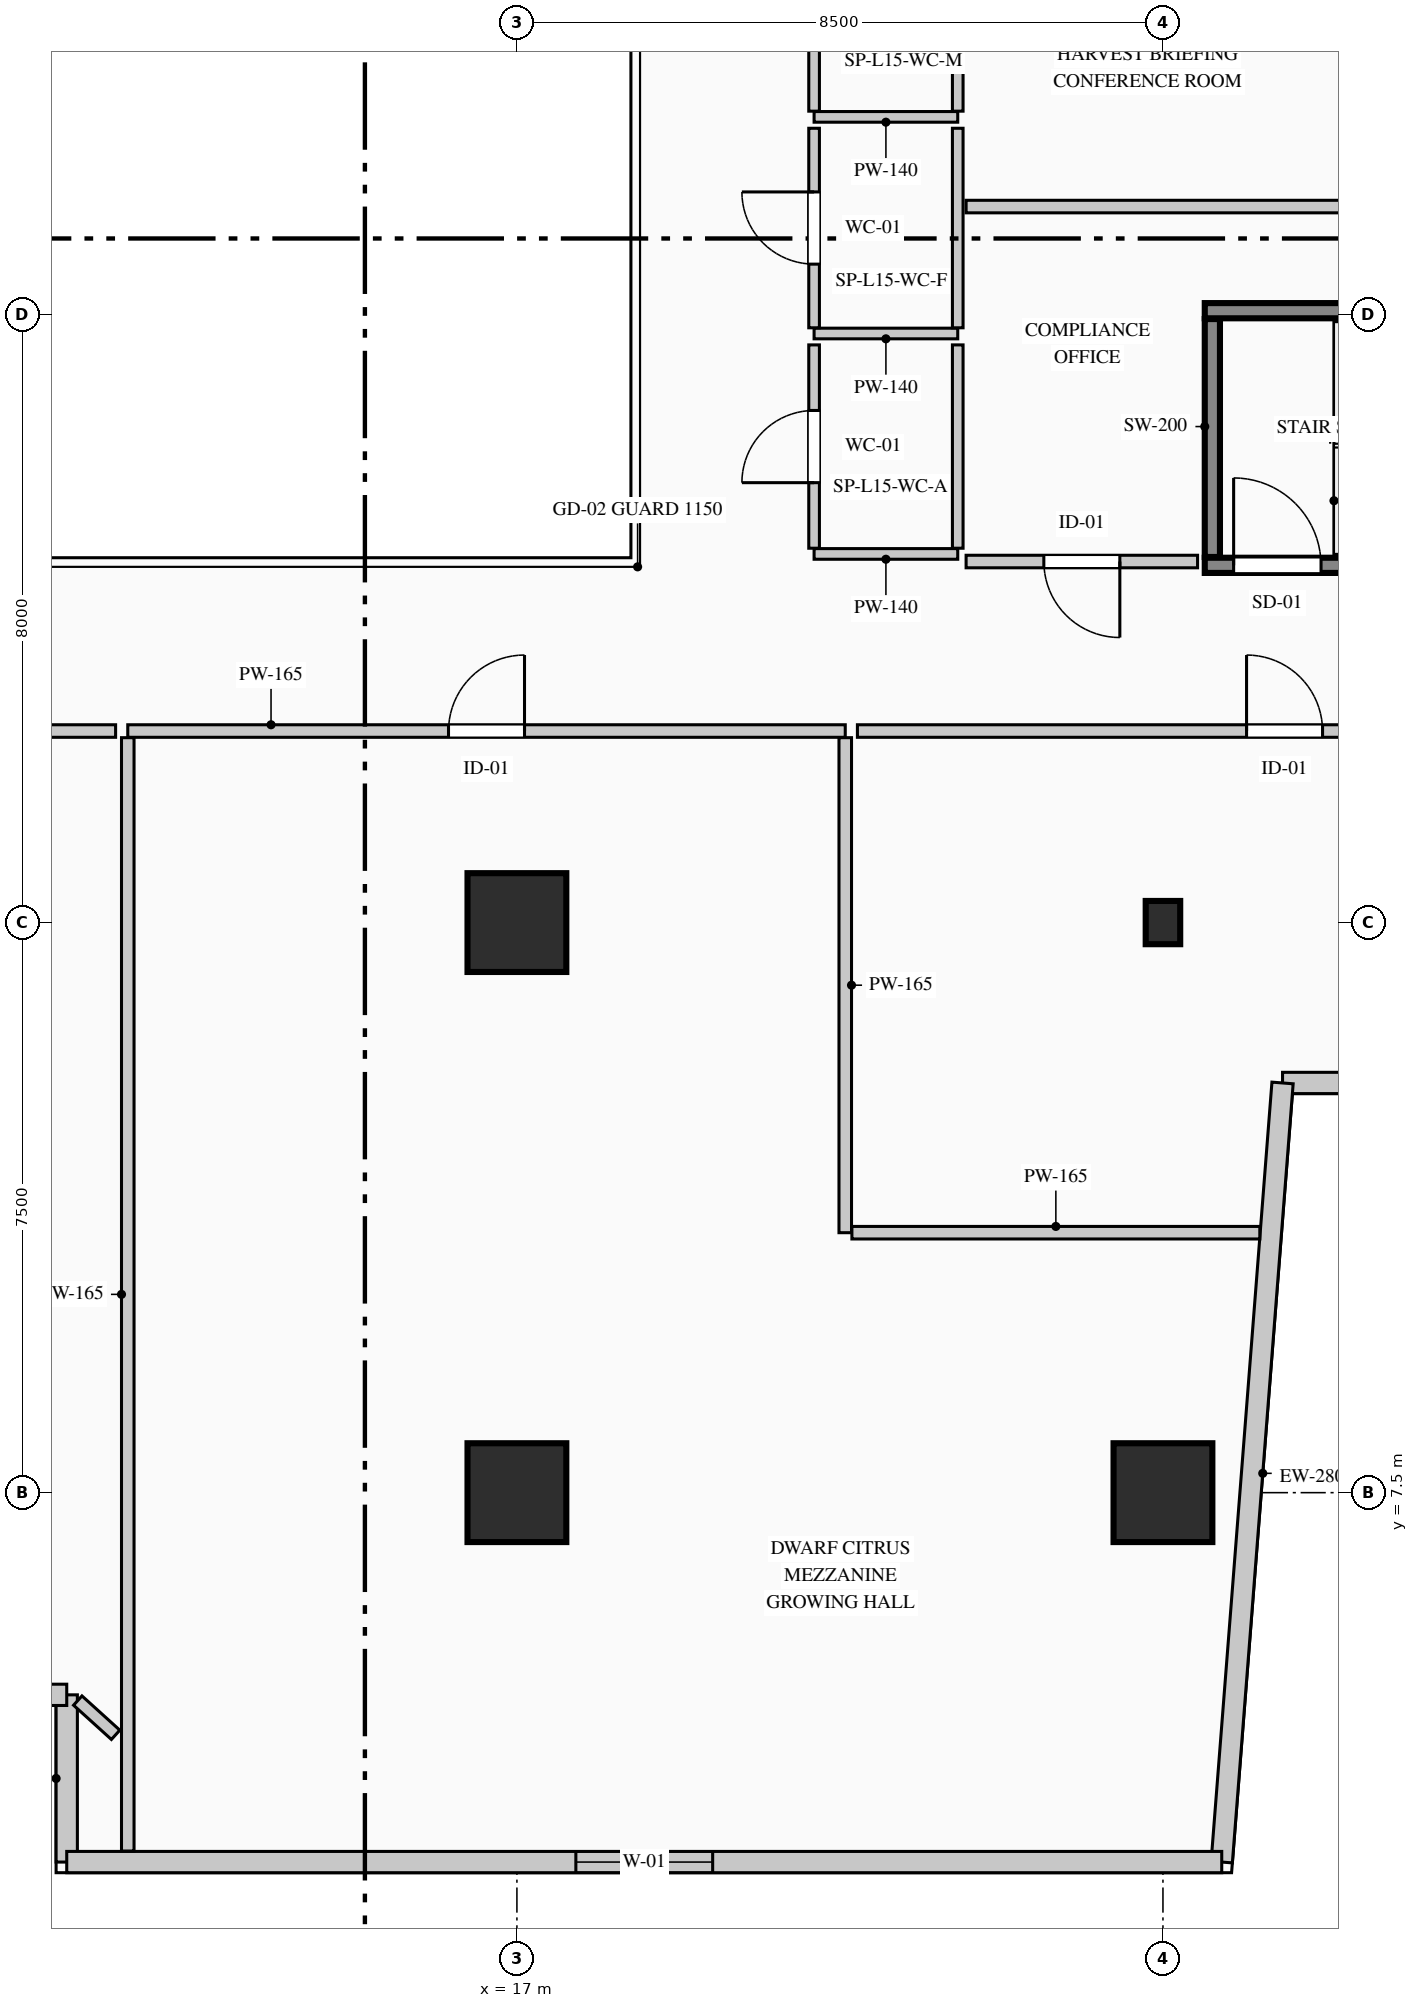
"""IFC4 building model, lengths in metres.
Left out: names, types, materials, properties, quantities, classifications, styles, units other than length and angle.
Written with IfcOpenShell. Run it as: python <this file> out.ifc"""

import sys

from ifc_helpers import new_model, si_unit, direction, frame, frame_2d, origin, origin_2d, place, context, subcontext, project, spatial, rectangle, i_section, extrude, element, fill, save


model = new_model("IFC4")
c1 = context("Model", 3, precision=1e-05, world=origin(), true_north=direction((0.0, 1.0)))
c2 = subcontext(c1, "Body", "Model", "MODEL_VIEW")
j1 = project(units=[si_unit("LENGTHUNIT", "METRE"), si_unit("PLANEANGLEUNIT", "RADIAN")], contexts=[c1])
p1 = place(None, origin())
s1 = spatial("IfcSite", under=j1, at=p1, CompositionType="ELEMENT")
p2 = place(p1, origin())
s2 = spatial("IfcBuilding", under=s1, at=p2, CompositionType="ELEMENT")
p3 = place(p2, frame((0.0, 0.0, 66.6)))
s3 = spatial("IfcBuildingStorey", under=s2, at=p3, CompositionType="ELEMENT", Elevation=66.6)
p4 = place(p3, frame((26.05, 19.7, 0.0), z_axis=(0.0, 0.0, 1.0), x_axis=(1.0, 0.0, 0.0)))
e1 = element("IfcWall", 1, at=p4, inside=s3, PredefinedType="SHEAR", context=c2, shape_type="SweptSolid", body=[
    extrude(rectangle(XDim=7.2, YDim=0.2, at=frame_2d((3.6, 0.0))), origin(), (0.0, 0.0, 1.0), 4.4),
])
p5 = place(p4, frame((0.38, 0.0, 0.0)))
e2 = element("IfcOpeningElement", 2, at=p5, cuts=e1, PredefinedType="OPENING", context=c2, shape_type="SweptSolid", body=[
    extrude(rectangle(XDim=1.15, YDim=2.2, at=frame_2d((0.575, 1.1))), frame((0.0, 0.11, 0.0), z_axis=(0.0, -1.0, 0.0), x_axis=(1.0, 0.0, 0.0)), (0.0, 0.0, 1.0), 0.22),
])
p6 = place(p3, frame((26.05, 23.05, 0.0), z_axis=(0.0, 0.0, 1.0), x_axis=(1.0, 0.0, 0.0)))
e3 = element("IfcWall", 3, at=p6, inside=s3, PredefinedType="SHEAR", context=c2, shape_type="SweptSolid", body=[
    extrude(rectangle(XDim=7.2, YDim=0.2, at=frame_2d((3.6, 0.0))), origin(), (0.0, 0.0, 1.0), 4.4),
])
p7 = place(p3, frame((26.15, 19.81, 0.0), z_axis=(0.0, 0.0, 1.0), x_axis=(0.0, 1.0, 0.0)))
e4 = element("IfcWall", 4, at=p7, inside=s3, PredefinedType="SHEAR", context=c2, shape_type="SweptSolid", body=[
    extrude(rectangle(XDim=3.13, YDim=0.2, at=frame_2d((1.565, 0.0))), origin(), (0.0, 0.0, 1.0), 4.4),
])
for number, where, z_axis, x_axis in (
    (5, (17.0, 7.5, 0.0), (0.0, 0.0, 1.0), (1.0, 0.0, 0.0)),
    (6, (17.0, 15.0, 0.0), (0.0, 0.0, 1.0), (1.0, 0.0, 0.0)),
    (7, (25.5, 7.5, 0.0), (0.0, 0.0, 1.0), (1.0, 0.0, 0.0)),
):
    element("IfcColumn", number, at=place(p3, frame(where, z_axis=z_axis, x_axis=x_axis)), inside=s3, PredefinedType="COLUMN", context=c2, shape_type="SweptSolid", body=[
        extrude(rectangle(XDim=1.3, YDim=1.3, at=origin_2d()), origin(), (0.0, 0.0, 1.0), 4.4),
    ])
p8 = place(p3, frame((25.5, 15.0, 0.0), z_axis=(0.0, 0.0, 1.0), x_axis=(1.0, 0.0, 0.0)))
e8 = element("IfcColumn", 8, at=p8, inside=s3, PredefinedType="COLUMN", context=c2, shape_type="SweptSolid", body=[
    extrude(i_section(OverallWidth=0.454, OverallDepth=0.569, WebThickness=0.078, FlangeThickness=0.08, FilletRadius=0.015, at=origin_2d()), origin(), (0.0, 0.0, 1.0), 4.4),
])
p9 = place(p3, frame((11.077, 2.64, 0.0), z_axis=(0.0, 0.0, 1.0), x_axis=(0.0, 1.0, 0.0)))
e9 = element("IfcWall", 9, at=p9, inside=s3, PredefinedType="STANDARD", context=c2, shape_type="SweptSolid", body=[
    extrude(rectangle(XDim=2.2, YDim=0.28, at=frame_2d((1.1, 0.0))), origin(), (0.0, 0.0, 1.0), 4.1),
])
p10 = place(p3, frame((11.077, 4.84, 0.0), z_axis=(0.0, 0.0, 1.0), x_axis=(-1.0, 0.0, 0.0)))
e10 = element("IfcWall", 10, at=p10, inside=s3, PredefinedType="STANDARD", context=c2, shape_type="SweptSolid", body=[
    extrude(rectangle(XDim=2.554, YDim=0.28, at=frame_2d((1.277, 0.0))), origin(), (0.0, 0.0, 1.0), 4.1),
])
p11 = place(p3, frame((35.77, 12.89, 0.0), z_axis=(0.0, 0.0, 1.0), x_axis=(-1.0, 0.0, 0.0)))
e11 = element("IfcWall", 11, at=p11, inside=s3, PredefinedType="STANDARD", context=c2, shape_type="SweptSolid", body=[
    extrude(rectangle(XDim=8.697, YDim=0.28, at=frame_2d((4.348, 0.0))), origin(), (0.0, 0.0, 1.0), 4.1),
])
p12 = place(p11, frame((4.666, 0.0, 0.9)))
e12 = element("IfcOpeningElement", 12, at=p12, cuts=e11, PredefinedType="OPENING", context=c2, shape_type="SweptSolid", body=[
    extrude(rectangle(XDim=1.8, YDim=2.1, at=frame_2d((0.9, 1.05))), frame((0.0, 0.15, 0.0), z_axis=(0.0, -1.0, 0.0), x_axis=(1.0, 0.0, 0.0)), (0.0, 0.0, 1.0), 0.3),
])
p13 = place(p3, frame((27.073, 12.89, 0.0), z_axis=(0.0, 0.0, 1.0), x_axis=(-0.077816860153, -0.996967670627, 0.0)))
e13 = element("IfcWall", 13, at=p13, inside=s3, PredefinedType="STANDARD", context=c2, shape_type="SweptSolid", body=[
    extrude(rectangle(XDim=10.281, YDim=0.28, at=frame_2d((5.141, 0.0))), origin(), (0.0, 0.0, 1.0), 4.1),
])
p14 = place(p3, frame((26.273, 2.64, 0.0), z_axis=(0.0, 0.0, 1.0), x_axis=(-1.0, 0.0, 0.0)))
e14 = element("IfcWall", 14, at=p14, inside=s3, PredefinedType="STANDARD", context=c2, shape_type="SweptSolid", body=[
    extrude(rectangle(XDim=15.197, YDim=0.28, at=frame_2d((7.598, 0.0))), origin(), (0.0, 0.0, 1.0), 4.1),
])
p15 = place(p14, frame((6.698, 0.0, 0.9)))
e15 = element("IfcOpeningElement", 15, at=p15, cuts=e14, PredefinedType="OPENING", context=c2, shape_type="SweptSolid", body=[
    extrude(rectangle(XDim=1.8, YDim=2.1, at=frame_2d((0.9, 1.05))), frame((0.0, 0.15, 0.0), z_axis=(0.0, -1.0, 0.0), x_axis=(1.0, 0.0, 0.0)), (0.0, 0.0, 1.0), 0.3),
])
p16 = place(p3, frame((22.8, 25.6, 0.0), z_axis=(0.0, 0.0, 1.0), x_axis=(-1.0, 0.0, 0.0)))
e16 = element("IfcWall", 16, at=p16, inside=s3, PredefinedType="PARTITIONING", context=c2, shape_type="SweptSolid", body=[
    extrude(rectangle(XDim=1.89, YDim=0.14, at=frame_2d((0.945, 0.0))), origin(), (0.0, 0.0, 1.0), 4.1),
])
p17 = place(p3, frame((20.91, 25.675, 0.0), z_axis=(0.0, 0.0, 1.0), x_axis=(0.0, 1.0, 0.0)))
e17 = element("IfcWall", 17, at=p17, inside=s3, PredefinedType="PARTITIONING", context=c2, shape_type="SweptSolid", body=[
    extrude(rectangle(XDim=2.775, YDim=0.14, at=frame_2d((1.387, 0.0))), origin(), (0.0, 0.0, 1.0), 4.1),
])
p18 = place(p17, frame((0.913, 0.0, 0.0)))
e18 = element("IfcOpeningElement", 18, at=p18, cuts=e17, PredefinedType="OPENING", context=c2, shape_type="SweptSolid", body=[
    extrude(rectangle(XDim=0.95, YDim=2.15, at=frame_2d((0.475, 1.075))), frame((0.0, 0.08, 0.0), z_axis=(0.0, -1.0, 0.0), x_axis=(1.0, 0.0, 0.0)), (0.0, 0.0, 1.0), 0.16),
])
p19 = place(p3, frame((22.8, 28.375, 0.0), z_axis=(0.0, 0.0, 1.0), x_axis=(0.0, -1.0, 0.0)))
e19 = element("IfcWall", 19, at=p19, inside=s3, PredefinedType="PARTITIONING", context=c2, shape_type="SweptSolid", body=[
    extrude(rectangle(XDim=2.7, YDim=0.14, at=frame_2d((1.35, 0.0))), origin(), (0.0, 0.0, 1.0), 3.725),
])
p20 = place(p3, frame((22.8, 22.75, 0.0), z_axis=(0.0, 0.0, 1.0), x_axis=(-1.0, 0.0, 0.0)))
e20 = element("IfcWall", 20, at=p20, inside=s3, PredefinedType="PARTITIONING", context=c2, shape_type="SweptSolid", body=[
    extrude(rectangle(XDim=1.89, YDim=0.14, at=frame_2d((0.945, 0.0))), origin(), (0.0, 0.0, 1.0), 4.1),
])
p21 = place(p3, frame((20.91, 22.825, 0.0), z_axis=(0.0, 0.0, 1.0), x_axis=(0.0, 1.0, 0.0)))
e21 = element("IfcWall", 21, at=p21, inside=s3, PredefinedType="PARTITIONING", context=c2, shape_type="SweptSolid", body=[
    extrude(rectangle(XDim=2.625, YDim=0.14, at=frame_2d((1.312, 0.0))), origin(), (0.0, 0.0, 1.0), 4.1),
])
p22 = place(p21, frame((0.837, 0.0, 0.0)))
e22 = element("IfcOpeningElement", 22, at=p22, cuts=e21, PredefinedType="OPENING", context=c2, shape_type="SweptSolid", body=[
    extrude(rectangle(XDim=0.95, YDim=2.15, at=frame_2d((0.475, 1.075))), frame((0.0, 0.08, 0.0), z_axis=(0.0, -1.0, 0.0), x_axis=(1.0, 0.0, 0.0)), (0.0, 0.0, 1.0), 0.16),
])
p23 = place(p3, frame((22.8, 25.45, 0.0), z_axis=(0.0, 0.0, 1.0), x_axis=(0.0, -1.0, 0.0)))
e23 = element("IfcWall", 23, at=p23, inside=s3, PredefinedType="PARTITIONING", context=c2, shape_type="SweptSolid", body=[
    extrude(rectangle(XDim=2.625, YDim=0.14, at=frame_2d((1.312, 0.0))), origin(), (0.0, 0.0, 1.0), 3.725),
])
p24 = place(p3, frame((22.8, 19.85, 0.0), z_axis=(0.0, 0.0, 1.0), x_axis=(-1.0, 0.0, 0.0)))
e24 = element("IfcWall", 24, at=p24, inside=s3, PredefinedType="PARTITIONING", context=c2, shape_type="SweptSolid", body=[
    extrude(rectangle(XDim=1.89, YDim=0.14, at=frame_2d((0.945, 0.0))), origin(), (0.0, 0.0, 1.0), 4.1),
])
p25 = place(p3, frame((20.91, 19.925, 0.0), z_axis=(0.0, 0.0, 1.0), x_axis=(0.0, 1.0, 0.0)))
e25 = element("IfcWall", 25, at=p25, inside=s3, PredefinedType="PARTITIONING", context=c2, shape_type="SweptSolid", body=[
    extrude(rectangle(XDim=2.675, YDim=0.14, at=frame_2d((1.337, 0.0))), origin(), (0.0, 0.0, 1.0), 4.1),
])
p26 = place(p25, frame((0.863, 0.0, 0.0)))
e26 = element("IfcOpeningElement", 26, at=p26, cuts=e25, PredefinedType="OPENING", context=c2, shape_type="SweptSolid", body=[
    extrude(rectangle(XDim=0.95, YDim=2.15, at=frame_2d((0.475, 1.075))), frame((0.0, 0.08, 0.0), z_axis=(0.0, -1.0, 0.0), x_axis=(1.0, 0.0, 0.0)), (0.0, 0.0, 1.0), 0.16),
])
p27 = place(p3, frame((22.8, 22.6, 0.0), z_axis=(0.0, 0.0, 1.0), x_axis=(0.0, -1.0, 0.0)))
e27 = element("IfcWall", 27, at=p27, inside=s3, PredefinedType="PARTITIONING", context=c2, shape_type="SweptSolid", body=[
    extrude(rectangle(XDim=2.675, YDim=0.14, at=frame_2d((1.337, 0.0))), origin(), (0.0, 0.0, 1.0), 3.725),
])
p28 = place(p3, frame((11.88, 17.52, 0.0), z_axis=(0.0, 0.0, 1.0), x_axis=(1.0, 0.0, 0.0)))
e28 = element("IfcWall", 28, at=p28, inside=s3, PredefinedType="PARTITIONING", context=c2, shape_type="SweptSolid", body=[
    extrude(rectangle(XDim=9.44, YDim=0.165, at=frame_2d((4.72, 0.0))), origin(), (0.0, 0.0, 1.0), 4.1),
])
p29 = place(p28, frame((4.22, 0.0, 0.0)))
e29 = element("IfcOpeningElement", 29, at=p29, cuts=e28, PredefinedType="OPENING", context=c2, shape_type="SweptSolid", body=[
    extrude(rectangle(XDim=1.0, YDim=2.15, at=frame_2d((0.5, 1.075))), frame((0.0, 0.093, 0.0), z_axis=(0.0, -1.0, 0.0), x_axis=(1.0, 0.0, 0.0)), (0.0, 0.0, 1.0), 0.185),
])
p30 = place(p3, frame((21.32, 17.433, 0.0), z_axis=(0.0, 0.0, 1.0), x_axis=(0.0, -1.0, 0.0)))
e30 = element("IfcWall", 30, at=p30, inside=s3, PredefinedType="PARTITIONING", context=c2, shape_type="SweptSolid", body=[
    extrude(rectangle(XDim=6.513, YDim=0.165, at=frame_2d((3.256, 0.0))), origin(), (0.0, 0.0, 1.0), 3.725),
])
p31 = place(p3, frame((21.407, 10.92, 0.0), z_axis=(0.0, 0.0, 1.0), x_axis=(1.0, 0.0, 0.0)))
e31 = element("IfcWall", 31, at=p31, inside=s3, PredefinedType="PARTITIONING", context=c2, shape_type="SweptSolid", body=[
    extrude(rectangle(XDim=5.367, YDim=0.165, at=frame_2d((2.684, 0.0))), origin(), (0.0, 0.0, 1.0), 4.1),
])
p32 = place(p3, frame((11.88, 2.785, 0.0), z_axis=(0.0, 0.0, 1.0), x_axis=(0.0, 1.0, 0.0)))
e32 = element("IfcWall", 32, at=p32, inside=s3, PredefinedType="PARTITIONING", context=c2, shape_type="SweptSolid", body=[
    extrude(rectangle(XDim=14.648, YDim=0.165, at=frame_2d((7.324, 0.0))), origin(), (0.0, 0.0, 1.0), 4.1),
])
p33 = place(p3, frame((11.72, 4.314, 0.0), z_axis=(0.0, 0.0, 1.0), x_axis=(-0.741303295748, 0.671170189827, 0.0)))
e33 = element("IfcWall", 33, at=p33, inside=s3, PredefinedType="PARTITIONING", context=c2, shape_type="SweptSolid", body=[
    extrude(rectangle(XDim=0.672, YDim=0.165, at=frame_2d((0.336, 0.0))), origin(), (0.0, 0.0, 1.0), 4.1),
])
p34 = place(p3, frame((6.74, 17.52, 0.0), z_axis=(0.0, 0.0, 1.0), x_axis=(1.0, 0.0, 0.0)))
e34 = element("IfcWall", 34, at=p34, inside=s3, PredefinedType="PARTITIONING", context=c2, shape_type="SweptSolid", body=[
    extrude(rectangle(XDim=4.979, YDim=0.165, at=frame_2d((2.49, 0.0))), origin(), (0.0, 0.0, 1.0), 4.1),
])
p35 = place(p34, frame((1.99, 0.0, 0.0)))
e35 = element("IfcOpeningElement", 35, at=p35, cuts=e34, PredefinedType="OPENING", context=c2, shape_type="SweptSolid", body=[
    extrude(rectangle(XDim=1.0, YDim=2.15, at=frame_2d((0.5, 1.075))), frame((0.0, 0.093, 0.0), z_axis=(0.0, -1.0, 0.0), x_axis=(1.0, 0.0, 0.0)), (0.0, 0.0, 1.0), 0.185),
])
p36 = place(p3, frame((21.48, 17.52, 0.0), z_axis=(0.0, 0.0, 1.0), x_axis=(1.0, 0.0, 0.0)))
e36 = element("IfcWall", 36, at=p36, inside=s3, PredefinedType="PARTITIONING", context=c2, shape_type="SweptSolid", body=[
    extrude(rectangle(XDim=11.24, YDim=0.165, at=frame_2d((5.62, 0.0))), origin(), (0.0, 0.0, 1.0), 3.885),
])
p37 = place(p36, frame((5.12, 0.0, 0.0)))
e37 = element("IfcOpeningElement", 37, at=p37, cuts=e36, PredefinedType="OPENING", context=c2, shape_type="SweptSolid", body=[
    extrude(rectangle(XDim=1.0, YDim=2.15, at=frame_2d((0.5, 1.075))), frame((0.0, 0.093, 0.0), z_axis=(0.0, -1.0, 0.0), x_axis=(1.0, 0.0, 0.0)), (0.0, 0.0, 1.0), 0.185),
])
p38 = place(p3, frame((25.956, 19.75, 0.0), z_axis=(0.0, 0.0, 1.0), x_axis=(-1.0, 0.0, 0.0)))
e38 = element("IfcWall", 38, at=p38, inside=s3, PredefinedType="PARTITIONING", context=c2, shape_type="SweptSolid", body=[
    extrude(rectangle(XDim=3.046, YDim=0.165, at=frame_2d((1.523, 0.0))), origin(), (0.0, 0.0, 1.0), 4.1),
])
p39 = place(p38, frame((1.023, 0.0, 0.0)))
e39 = element("IfcOpeningElement", 39, at=p39, cuts=e38, PredefinedType="OPENING", context=c2, shape_type="SweptSolid", body=[
    extrude(rectangle(XDim=1.0, YDim=2.15, at=frame_2d((0.5, 1.075))), frame((0.0, 0.093, 0.0), z_axis=(0.0, -1.0, 0.0), x_axis=(1.0, 0.0, 0.0)), (0.0, 0.0, 1.0), 0.185),
])
p40 = place(p3, frame((22.91, 24.42, 0.0), z_axis=(0.0, 0.0, 1.0), x_axis=(1.0, 0.0, 0.0)))
e40 = element("IfcWall", 40, at=p40, inside=s3, PredefinedType="PARTITIONING", context=c2, shape_type="SweptSolid", body=[
    extrude(rectangle(XDim=9.81, YDim=0.165, at=frame_2d((4.905, 0.0))), origin(), (0.0, 0.0, 1.0), 3.725),
])
p41 = place(p15, origin())
e41 = element("IfcWindow", 41, at=p41, inside=s3, PartitioningType="SINGLE_PANEL", PredefinedType="WINDOW", context=c2, shape_type="SweptSolid", body=[
    extrude(rectangle(XDim=1.8, YDim=2.1, at=frame_2d((0.9, 1.05))), frame((0.0, 0.03, 0.0), z_axis=(0.0, -1.0, 0.0), x_axis=(1.0, 0.0, 0.0)), (0.0, 0.0, 1.0), 0.06),
])
fill(e15, e41)
p42 = place(p5, origin())
e42 = element("IfcDoor", 42, at=p42, inside=s3, OperationType="SINGLE_SWING_LEFT", PredefinedType="DOOR", context=c2, shape_type="SweptSolid", body=[
    extrude(rectangle(XDim=1.15, YDim=2.2, at=frame_2d((0.575, 1.1))), frame((0.0, 0.025, 0.0), z_axis=(0.0, -1.0, 0.0), x_axis=(1.0, 0.0, 0.0)), (0.0, 0.0, 1.0), 0.05),
])
fill(e2, e42)
p43 = place(p22, origin())
e43 = element("IfcDoor", 43, at=p43, inside=s3, OperationType="SINGLE_SWING_RIGHT", PredefinedType="DOOR", context=c2, shape_type="SweptSolid", body=[
    extrude(rectangle(XDim=0.95, YDim=2.15, at=frame_2d((0.475, 1.075))), frame((0.0, 0.025, 0.0), z_axis=(0.0, -1.0, 0.0), x_axis=(1.0, 0.0, 0.0)), (0.0, 0.0, 1.0), 0.05),
])
fill(e22, e43)
p44 = place(p26, origin())
e44 = element("IfcDoor", 44, at=p44, inside=s3, OperationType="SINGLE_SWING_LEFT", PredefinedType="DOOR", context=c2, shape_type="SweptSolid", body=[
    extrude(rectangle(XDim=0.95, YDim=2.15, at=frame_2d((0.475, 1.075))), frame((0.0, 0.025, 0.0), z_axis=(0.0, -1.0, 0.0), x_axis=(1.0, 0.0, 0.0)), (0.0, 0.0, 1.0), 0.05),
])
fill(e26, e44)
p45 = place(p29, origin())
e45 = element("IfcDoor", 45, at=p45, inside=s3, OperationType="SINGLE_SWING_RIGHT", PredefinedType="DOOR", context=c2, shape_type="SweptSolid", body=[
    extrude(rectangle(XDim=1.0, YDim=2.15, at=frame_2d((0.5, 1.075))), frame((0.0, 0.025, 0.0), z_axis=(0.0, -1.0, 0.0), x_axis=(1.0, 0.0, 0.0)), (0.0, 0.0, 1.0), 0.05),
])
fill(e29, e45)
p46 = place(p37, origin())
e46 = element("IfcDoor", 46, at=p46, inside=s3, OperationType="SINGLE_SWING_LEFT", PredefinedType="DOOR", context=c2, shape_type="SweptSolid", body=[
    extrude(rectangle(XDim=1.0, YDim=2.15, at=frame_2d((0.5, 1.075))), frame((0.0, 0.025, 0.0), z_axis=(0.0, -1.0, 0.0), x_axis=(1.0, 0.0, 0.0)), (0.0, 0.0, 1.0), 0.05),
])
fill(e37, e46)
p47 = place(p39, origin())
e47 = element("IfcDoor", 47, at=p47, inside=s3, OperationType="SINGLE_SWING_LEFT", PredefinedType="DOOR", context=c2, shape_type="SweptSolid", body=[
    extrude(rectangle(XDim=1.0, YDim=2.15, at=frame_2d((0.5, 1.075))), frame((0.0, 0.025, 0.0), z_axis=(0.0, -1.0, 0.0), x_axis=(1.0, 0.0, 0.0)), (0.0, 0.0, 1.0), 0.05),
])
fill(e39, e47)
save(model, sys.argv[1])
